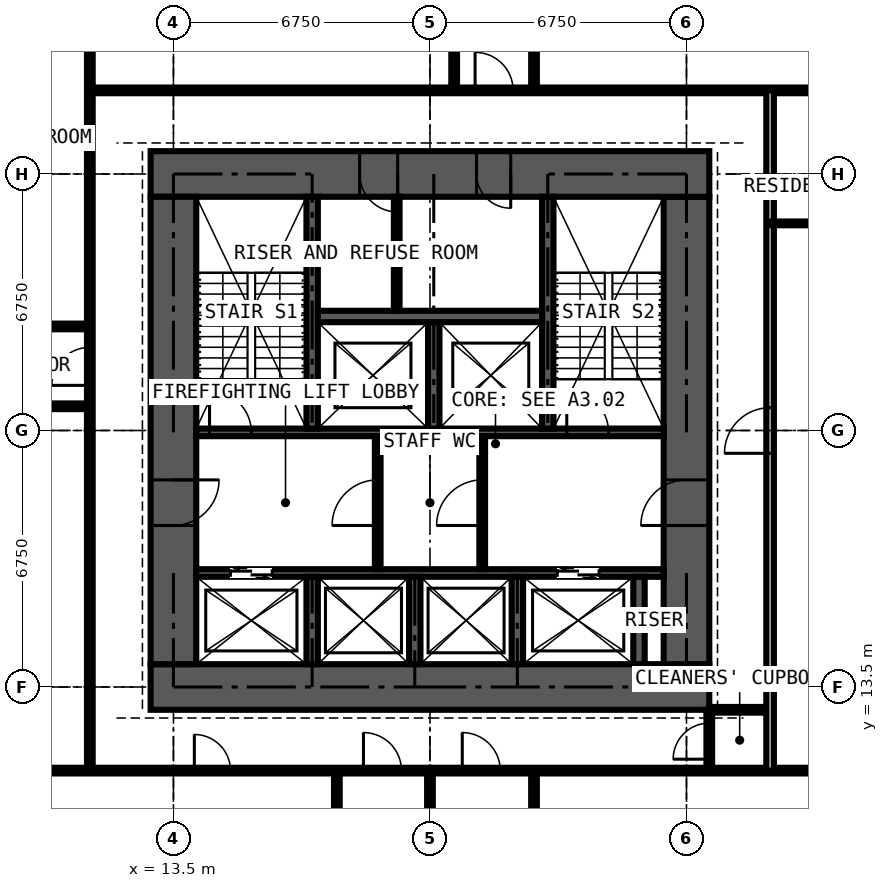
"""IFC4 building model, lengths in metres.
Left out: names, types, materials, properties, quantities, classifications, styles, units other than length and angle.
Written with IfcOpenShell. Run it as: python <this file> out.ifc"""

import sys

from ifc_helpers import new_model, si_unit, direction, frame, frame_2d, origin, place, context, subcontext, project, spatial, rectangle, extrude, element, fill, save


model = new_model("IFC4")
c1 = context("Model", 3, precision=1e-05, world=origin(), true_north=direction((0.0, 1.0)))
c2 = subcontext(c1, "Body", "Model", "MODEL_VIEW")
j1 = project(units=[si_unit("LENGTHUNIT", "METRE"), si_unit("PLANEANGLEUNIT", "RADIAN")], contexts=[c1])
p1 = place(None, origin())
s1 = spatial("IfcSite", under=j1, at=p1, CompositionType="ELEMENT")
p2 = place(p1, origin())
s2 = spatial("IfcBuilding", under=s1, at=p2, CompositionType="ELEMENT")
p3 = place(p2, frame((0.0, 0.0, 18.0)))
s3 = spatial("IfcBuildingStorey", under=s2, at=p3, CompositionType="ELEMENT", Elevation=18.0)
p4 = place(p3, frame((12.9, 13.5, 0.0), z_axis=(0.0, 0.0, 1.0), x_axis=(1.0, 0.0, 0.0)))
e1 = element("IfcWall", 1, at=p4, inside=s3, PredefinedType="SHEAR", context=c2, shape_type="SweptSolid", body=[
    extrude(rectangle(XDim=14.7, YDim=1.2, at=frame_2d((7.35, 0.0))), origin(), (0.0, 0.0, 1.0), 3.6),
])
p5 = place(p3, frame((27.0, 14.1, 0.0), z_axis=(0.0, 0.0, 1.0), x_axis=(0.0, 1.0, 0.0)))
e2 = element("IfcWall", 2, at=p5, inside=s3, PredefinedType="SHEAR", context=c2, shape_type="SweptSolid", body=[
    extrude(rectangle(XDim=12.3, YDim=1.2, at=frame_2d((6.15, 0.0))), origin(), (0.0, 0.0, 1.0), 3.6),
])
p6 = place(p5, frame((3.65, 0.0, 0.0)))
e3 = element("IfcOpeningElement", 3, at=p6, cuts=e2, PredefinedType="OPENING", context=c2, shape_type="SweptSolid", body=[
    extrude(rectangle(XDim=1.2, YDim=2.2, at=frame_2d((0.6, 1.1))), frame((0.0, 0.61, 0.0), z_axis=(0.0, -1.0, 0.0), x_axis=(1.0, 0.0, 0.0)), (0.0, 0.0, 1.0), 1.22),
])
p7 = place(p3, frame((27.6, 27.0, 0.0), z_axis=(0.0, 0.0, 1.0), x_axis=(-1.0, 0.0, 0.0)))
e4 = element("IfcWall", 4, at=p7, inside=s3, PredefinedType="SHEAR", context=c2, shape_type="SweptSolid", body=[
    extrude(rectangle(XDim=14.7, YDim=1.2, at=frame_2d((7.35, 0.0))), origin(), (0.0, 0.0, 1.0), 3.6),
])
p8 = place(p7, frame((5.225, 0.0, 0.0)))
e5 = element("IfcOpeningElement", 5, at=p8, cuts=e4, PredefinedType="OPENING", context=c2, shape_type="SweptSolid", body=[
    extrude(rectangle(XDim=0.9, YDim=2.2, at=frame_2d((0.45, 1.1))), frame((0.0, 0.61, 0.0), z_axis=(0.0, -1.0, 0.0), x_axis=(1.0, 0.0, 0.0)), (0.0, 0.0, 1.0), 1.22),
])
p9 = place(p7, frame((8.2, 0.0, 0.0)))
e6 = element("IfcOpeningElement", 6, at=p9, cuts=e4, PredefinedType="OPENING", context=c2, shape_type="SweptSolid", body=[
    extrude(rectangle(XDim=1.0, YDim=2.2, at=frame_2d((0.5, 1.1))), frame((0.0, 0.61, 0.0), z_axis=(0.0, -1.0, 0.0), x_axis=(1.0, 0.0, 0.0)), (0.0, 0.0, 1.0), 1.22),
])
p10 = place(p3, frame((13.5, 26.4, 0.0), z_axis=(0.0, 0.0, 1.0), x_axis=(0.0, -1.0, 0.0)))
e7 = element("IfcWall", 7, at=p10, inside=s3, PredefinedType="SHEAR", context=c2, shape_type="SweptSolid", body=[
    extrude(rectangle(XDim=12.3, YDim=1.2, at=frame_2d((6.15, 0.0))), origin(), (0.0, 0.0, 1.0), 3.6),
])
p11 = place(p10, frame((7.45, 0.0, 0.0)))
e8 = element("IfcOpeningElement", 8, at=p11, cuts=e7, PredefinedType="OPENING", context=c2, shape_type="SweptSolid", body=[
    extrude(rectangle(XDim=1.2, YDim=2.2, at=frame_2d((0.6, 1.1))), frame((0.0, 0.61, 0.0), z_axis=(0.0, -1.0, 0.0), x_axis=(1.0, 0.0, 0.0)), (0.0, 0.0, 1.0), 1.22),
])
p12 = place(p3, frame((14.1, 16.5, 0.0), z_axis=(0.0, 0.0, 1.0), x_axis=(1.0, 0.0, 0.0)))
e9 = element("IfcWall", 9, at=p12, inside=s3, PredefinedType="SHEAR", context=c2, shape_type="SweptSolid", body=[
    extrude(rectangle(XDim=12.3, YDim=0.2, at=frame_2d((6.15, 0.0))), origin(), (0.0, 0.0, 1.0), 3.6),
])
p13 = place(p12, frame((0.9, 0.0, 0.0)))
e10 = element("IfcOpeningElement", 10, at=p13, cuts=e9, PredefinedType="OPENING", context=c2, shape_type="SweptSolid", body=[
    extrude(rectangle(XDim=1.1, YDim=2.2, at=frame_2d((0.55, 1.1))), frame((0.0, 0.11, 0.0), z_axis=(0.0, -1.0, 0.0), x_axis=(1.0, 0.0, 0.0)), (0.0, 0.0, 1.0), 0.22),
])
p14 = place(p12, frame((9.5, 0.0, 0.0)))
e11 = element("IfcOpeningElement", 11, at=p14, cuts=e9, PredefinedType="OPENING", context=c2, shape_type="SweptSolid", body=[
    extrude(rectangle(XDim=1.1, YDim=2.2, at=frame_2d((0.55, 1.1))), frame((0.0, 0.11, 0.0), z_axis=(0.0, -1.0, 0.0), x_axis=(1.0, 0.0, 0.0)), (0.0, 0.0, 1.0), 0.22),
])
p15 = place(p3, frame((14.1, 20.2, 0.0), z_axis=(0.0, 0.0, 1.0), x_axis=(1.0, 0.0, 0.0)))
e12 = element("IfcWall", 12, at=p15, inside=s3, PredefinedType="SHEAR", context=c2, shape_type="SweptSolid", body=[
    extrude(rectangle(XDim=12.3, YDim=0.2, at=frame_2d((6.15, 0.0))), origin(), (0.0, 0.0, 1.0), 3.6),
])
p16 = place(p15, frame((0.35, 0.0, 0.0)))
e13 = element("IfcOpeningElement", 13, at=p16, cuts=e12, PredefinedType="OPENING", context=c2, shape_type="SweptSolid", body=[
    extrude(rectangle(XDim=1.1, YDim=2.2, at=frame_2d((0.55, 1.1))), frame((0.0, 0.11, 0.0), z_axis=(0.0, -1.0, 0.0), x_axis=(1.0, 0.0, 0.0)), (0.0, 0.0, 1.0), 0.22),
])
p17 = place(p15, frame((9.75, 0.0, 0.0)))
e14 = element("IfcOpeningElement", 14, at=p17, cuts=e12, PredefinedType="OPENING", context=c2, shape_type="SweptSolid", body=[
    extrude(rectangle(XDim=1.1, YDim=2.2, at=frame_2d((0.55, 1.1))), frame((0.0, 0.11, 0.0), z_axis=(0.0, -1.0, 0.0), x_axis=(1.0, 0.0, 0.0)), (0.0, 0.0, 1.0), 0.22),
])
for number, where, z_axis, x_axis in (
    (15, (17.15, 20.3, 0.0), (0.0, 0.0, 1.0), (0.0, 1.0, 0.0)),
    (16, (23.35, 20.3, 0.0), (0.0, 0.0, 1.0), (0.0, 1.0, 0.0)),
):
    element("IfcWall", number, at=place(p3, frame(where, z_axis=z_axis, x_axis=x_axis)), inside=s3, PredefinedType="SHEAR", context=c2, shape_type="SweptSolid", body=[
        extrude(rectangle(XDim=6.1, YDim=0.3, at=frame_2d((3.05, 0.0))), origin(), (0.0, 0.0, 1.0), 3.6),
    ])
p18 = place(p3, frame((20.35, 20.3, 0.0), z_axis=(0.0, 0.0, 1.0), x_axis=(0.0, 1.0, 0.0)))
e17 = element("IfcWall", 17, at=p18, inside=s3, PredefinedType="SHEAR", context=c2, shape_type="SweptSolid", body=[
    extrude(rectangle(XDim=2.8, YDim=0.3, at=frame_2d((1.4, 0.0))), origin(), (0.0, 0.0, 1.0), 3.6),
])
p19 = place(p3, frame((17.3, 23.25, 0.0), z_axis=(0.0, 0.0, 1.0), x_axis=(1.0, 0.0, 0.0)))
e18 = element("IfcWall", 18, at=p19, inside=s3, PredefinedType="SHEAR", context=c2, shape_type="SweptSolid", body=[
    extrude(rectangle(XDim=5.9, YDim=0.3, at=frame_2d((2.95, 0.0))), origin(), (0.0, 0.0, 1.0), 3.6),
])
for number, where, z_axis, x_axis in (
    (19, (17.15, 14.1, 0.0), (0.0, 0.0, 1.0), (0.0, 1.0, 0.0)),
    (20, (19.85, 14.1, 0.0), (0.0, 0.0, 1.0), (0.0, 1.0, 0.0)),
    (21, (22.55, 14.1, 0.0), (0.0, 0.0, 1.0), (0.0, 1.0, 0.0)),
    (22, (25.75, 14.1, 0.0), (0.0, 0.0, 1.0), (0.0, 1.0, 0.0)),
):
    element("IfcWall", number, at=place(p3, frame(where, z_axis=z_axis, x_axis=x_axis)), inside=s3, PredefinedType="SHEAR", context=c2, shape_type="SweptSolid", body=[
        extrude(rectangle(XDim=2.3, YDim=0.3, at=frame_2d((1.15, 0.0))), origin(), (0.0, 0.0, 1.0), 3.6),
    ])
p20 = place(p3, frame((18.875, 16.6, 0.0), z_axis=(0.0, 0.0, 1.0), x_axis=(0.0, 1.0, 0.0)))
e23 = element("IfcWall", 23, at=p20, inside=s3, PredefinedType="PARTITIONING", context=c2, shape_type="SweptSolid", body=[
    extrude(rectangle(XDim=3.5, YDim=0.15, at=frame_2d((1.75, 0.0))), origin(), (0.0, 0.0, 1.0), 3.375),
])
p21 = place(p20, frame((1.15, 0.0, 0.0)))
e24 = element("IfcOpeningElement", 24, at=p21, cuts=e23, PredefinedType="OPENING", context=c2, shape_type="SweptSolid", body=[
    extrude(rectangle(XDim=1.2, YDim=2.2, at=frame_2d((0.6, 1.1))), frame((0.0, 0.085, 0.0), z_axis=(0.0, -1.0, 0.0), x_axis=(1.0, 0.0, 0.0)), (0.0, 0.0, 1.0), 0.17),
])
p22 = place(p3, frame((21.625, 16.6, 0.0), z_axis=(0.0, 0.0, 1.0), x_axis=(0.0, 1.0, 0.0)))
e25 = element("IfcWall", 25, at=p22, inside=s3, PredefinedType="PARTITIONING", context=c2, shape_type="SweptSolid", body=[
    extrude(rectangle(XDim=3.5, YDim=0.15, at=frame_2d((1.75, 0.0))), origin(), (0.0, 0.0, 1.0), 3.375),
])
p23 = place(p22, frame((1.15, 0.0, 0.0)))
e26 = element("IfcOpeningElement", 26, at=p23, cuts=e25, PredefinedType="OPENING", context=c2, shape_type="SweptSolid", body=[
    extrude(rectangle(XDim=1.2, YDim=2.2, at=frame_2d((0.6, 1.1))), frame((0.0, 0.085, 0.0), z_axis=(0.0, -1.0, 0.0), x_axis=(1.0, 0.0, 0.0)), (0.0, 0.0, 1.0), 0.17),
])
p24 = place(p3, frame((19.375, 23.4, 0.0), z_axis=(0.0, 0.0, 1.0), x_axis=(0.0, 1.0, 0.0)))
e27 = element("IfcWall", 27, at=p24, inside=s3, PredefinedType="PARTITIONING", context=c2, shape_type="SweptSolid", body=[
    extrude(rectangle(XDim=3.0, YDim=0.15, at=frame_2d((1.5, 0.0))), origin(), (0.0, 0.0, 1.0), 3.375),
])
for number, where, z_axis, x_axis in (
    (28, (5.65, 20.887, 0.0), (0.0, 0.0, 1.0), (1.0, 0.0, 0.0)),
    (29, (5.65, 22.988, 0.0), (0.0, 0.0, 1.0), (1.0, 0.0, 0.0)),
):
    element("IfcWall", number, at=place(p3, frame(where, z_axis=z_axis, x_axis=x_axis)), inside=s3, PredefinedType="PARTITIONING", context=c2, shape_type="SweptSolid", body=[
        extrude(rectangle(XDim=5.65, YDim=0.15, at=frame_2d((2.825, 0.0))), origin(), (0.0, 0.0, 1.0), 3.375),
    ])
p25 = place(p3, frame((10.125, 11.3, 0.0), z_axis=(0.0, 0.0, 1.0), x_axis=(1.0, 0.0, 0.0)))
e30 = element("IfcWall", 30, at=p25, inside=s3, PredefinedType="PARTITIONING", context=c2, shape_type="SweptSolid", body=[
    extrude(rectangle(XDim=20.675, YDim=0.15, at=frame_2d((10.337, 0.0))), origin(), (0.0, 0.0, 1.0), 3.375),
])
p26 = place(p25, frame((8.375, 0.0, 0.0)))
e31 = element("IfcOpeningElement", 31, at=p26, cuts=e30, PredefinedType="OPENING", context=c2, shape_type="SweptSolid", body=[
    extrude(rectangle(XDim=1.0, YDim=2.2, at=frame_2d((0.5, 1.1))), frame((0.0, 0.085, 0.0), z_axis=(0.0, -1.0, 0.0), x_axis=(1.0, 0.0, 0.0)), (0.0, 0.0, 1.0), 0.17),
])
p27 = place(p25, frame((10.975, 0.0, 0.0)))
e32 = element("IfcOpeningElement", 32, at=p27, cuts=e30, PredefinedType="OPENING", context=c2, shape_type="SweptSolid", body=[
    extrude(rectangle(XDim=1.0, YDim=2.2, at=frame_2d((0.5, 1.1))), frame((0.0, 0.085, 0.0), z_axis=(0.0, -1.0, 0.0), x_axis=(1.0, 0.0, 0.0)), (0.0, 0.0, 1.0), 0.17),
])
p28 = place(p25, frame((3.925, 0.0, 0.0)))
e33 = element("IfcOpeningElement", 33, at=p28, cuts=e30, PredefinedType="OPENING", context=c2, shape_type="SweptSolid", body=[
    extrude(rectangle(XDim=0.95, YDim=2.2, at=frame_2d((0.475, 1.1))), frame((0.0, 0.085, 0.0), z_axis=(0.0, -1.0, 0.0), x_axis=(1.0, 0.0, 0.0)), (0.0, 0.0, 1.0), 0.17),
])
p29 = place(p3, frame((11.3, 11.3, 0.0), z_axis=(0.0, 0.0, 1.0), x_axis=(0.0, 1.0, 0.0)))
e34 = element("IfcWall", 34, at=p29, inside=s3, PredefinedType="PARTITIONING", context=c2, shape_type="SweptSolid", body=[
    extrude(rectangle(XDim=19.075, YDim=0.15, at=frame_2d((9.538, 0.0))), origin(), (0.0, 0.0, 1.0), 3.375),
])
p30 = place(p29, frame((10.137, 0.0, 0.0)))
e35 = element("IfcOpeningElement", 35, at=p30, cuts=e34, PredefinedType="OPENING", context=c2, shape_type="SweptSolid", body=[
    extrude(rectangle(XDim=1.0, YDim=2.2, at=frame_2d((0.5, 1.1))), frame((0.0, 0.085, 0.0), z_axis=(0.0, -1.0, 0.0), x_axis=(1.0, 0.0, 0.0)), (0.0, 0.0, 1.0), 0.17),
])
p31 = place(p3, frame((11.3, 29.2, 0.0), z_axis=(0.0, 0.0, 1.0), x_axis=(1.0, 0.0, 0.0)))
e36 = element("IfcWall", 36, at=p31, inside=s3, PredefinedType="PARTITIONING", context=c2, shape_type="SweptSolid", body=[
    extrude(rectangle(XDim=19.075, YDim=0.15, at=frame_2d((9.538, 0.0))), origin(), (0.0, 0.0, 1.0), 3.375),
])
p32 = place(p31, frame((10.137, 0.0, 0.0)))
e37 = element("IfcOpeningElement", 37, at=p32, cuts=e36, PredefinedType="OPENING", context=c2, shape_type="SweptSolid", body=[
    extrude(rectangle(XDim=1.0, YDim=2.2, at=frame_2d((0.5, 1.1))), frame((0.0, 0.085, 0.0), z_axis=(0.0, -1.0, 0.0), x_axis=(1.0, 0.0, 0.0)), (0.0, 0.0, 1.0), 0.17),
])
p33 = place(p3, frame((17.8, 5.65, 0.0), z_axis=(0.0, 0.0, 1.0), x_axis=(0.0, 1.0, 0.0)))
e38 = element("IfcWall", 38, at=p33, inside=s3, PredefinedType="PARTITIONING", context=c2, shape_type="SweptSolid", body=[
    extrude(rectangle(XDim=5.65, YDim=0.15, at=frame_2d((2.825, 0.0))), origin(), (0.0, 0.0, 1.0), 3.375),
])
p34 = place(p3, frame((20.25, -0.734, 0.0), z_axis=(0.0, 0.0, 1.0), x_axis=(0.0, 1.0, 0.0)))
e39 = element("IfcWall", 39, at=p34, inside=s3, PredefinedType="PARTITIONING", context=c2, shape_type="SweptSolid", body=[
    extrude(rectangle(XDim=12.034, YDim=0.15, at=frame_2d((6.017, 0.0))), origin(), (0.0, 0.0, 1.0), 2.61),
])
for number, where, z_axis, x_axis in (
    (40, (20.887, 29.2, 0.0), (0.0, 0.0, 1.0), (0.0, 1.0, 0.0)),
    (41, (22.988, 5.65, 0.0), (0.0, 0.0, 1.0), (0.0, 1.0, 0.0)),
    (42, (22.988, 29.2, 0.0), (0.0, 0.0, 1.0), (0.0, 1.0, 0.0)),
):
    element("IfcWall", number, at=place(p3, frame(where, z_axis=z_axis, x_axis=x_axis)), inside=s3, PredefinedType="PARTITIONING", context=c2, shape_type="SweptSolid", body=[
        extrude(rectangle(XDim=5.65, YDim=0.15, at=frame_2d((2.825, 0.0))), origin(), (0.0, 0.0, 1.0), 3.375),
    ])
p35 = place(p3, frame((27.6, 11.3, 0.0), z_axis=(0.0, 0.0, 1.0), x_axis=(0.0, 1.0, 0.0)))
e43 = element("IfcWall", 43, at=p35, inside=s3, PredefinedType="PARTITIONING", context=c2, shape_type="SweptSolid", body=[
    extrude(rectangle(XDim=1.6, YDim=0.15, at=frame_2d((0.8, 0.0))), origin(), (0.0, 0.0, 1.0), 3.375),
])
p36 = place(p35, frame((0.3, 0.0, 0.0)))
e44 = element("IfcOpeningElement", 44, at=p36, cuts=e43, PredefinedType="OPENING", context=c2, shape_type="SweptSolid", body=[
    extrude(rectangle(XDim=0.95, YDim=2.2, at=frame_2d((0.475, 1.1))), frame((0.0, 0.085, 0.0), z_axis=(0.0, -1.0, 0.0), x_axis=(1.0, 0.0, 0.0)), (0.0, 0.0, 1.0), 0.17),
])
p37 = place(p3, frame((27.6, 12.9, 0.0), z_axis=(0.0, 0.0, 1.0), x_axis=(1.0, 0.0, 0.0)))
e45 = element("IfcWall", 45, at=p37, inside=s3, PredefinedType="PARTITIONING", context=c2, shape_type="SweptSolid", body=[
    extrude(rectangle(XDim=1.6, YDim=0.15, at=frame_2d((0.8, 0.0))), origin(), (0.0, 0.0, 1.0), 2.877),
])
p38 = place(p3, frame((29.2, 11.3, 0.0), z_axis=(0.0, 0.0, 1.0), x_axis=(0.0, 1.0, 0.0)))
e46 = element("IfcWall", 46, at=p38, inside=s3, PredefinedType="PARTITIONING", context=c2, shape_type="SweptSolid", body=[
    extrude(rectangle(XDim=17.9, YDim=0.2, at=frame_2d((8.95, 0.0))), origin(), (0.0, 0.0, 1.0), 3.375),
])
p39 = place(p38, frame((8.35, 0.0, 0.0)))
e47 = element("IfcOpeningElement", 47, at=p39, cuts=e46, PredefinedType="OPENING", context=c2, shape_type="SweptSolid", body=[
    extrude(rectangle(XDim=1.2, YDim=2.2, at=frame_2d((0.6, 1.1))), frame((0.0, 0.11, 0.0), z_axis=(0.0, -1.0, 0.0), x_axis=(1.0, 0.0, 0.0)), (0.0, 0.0, 1.0), 0.22),
])
p40 = place(p3, frame((29.2, 25.7, 0.0), z_axis=(0.0, 0.0, 1.0), x_axis=(1.0, 0.0, 0.0)))
e48 = element("IfcWall", 48, at=p40, inside=s3, PredefinedType="SHEAR", context=c2, shape_type="SweptSolid", body=[
    extrude(rectangle(XDim=3.45, YDim=0.1, at=frame_2d((1.725, 0.0))), origin(), (0.0, 0.0, 1.0), 3.375),
])
p41 = place(p13, origin())
e49 = element("IfcDoor", 49, at=p41, inside=s3, OperationType="DOUBLE_DOOR_SLIDING", PredefinedType="DOOR", context=c2, shape_type="SweptSolid", body=[
    extrude(rectangle(XDim=1.1, YDim=2.2, at=frame_2d((0.55, 1.1))), frame((0.0, 0.025, 0.0), z_axis=(0.0, -1.0, 0.0), x_axis=(1.0, 0.0, 0.0)), (0.0, 0.0, 1.0), 0.05),
])
fill(e10, e49)
p42 = place(p14, origin())
e50 = element("IfcDoor", 50, at=p42, inside=s3, OperationType="DOUBLE_DOOR_SLIDING", PredefinedType="DOOR", context=c2, shape_type="SweptSolid", body=[
    extrude(rectangle(XDim=1.1, YDim=2.2, at=frame_2d((0.55, 1.1))), frame((0.0, 0.025, 0.0), z_axis=(0.0, -1.0, 0.0), x_axis=(1.0, 0.0, 0.0)), (0.0, 0.0, 1.0), 0.05),
])
fill(e11, e50)
p43 = place(p11, origin())
e51 = element("IfcDoor", 51, at=p43, inside=s3, OperationType="DOUBLE_DOOR_SINGLE_SWING", PredefinedType="DOOR", context=c2, shape_type="SweptSolid", body=[
    extrude(rectangle(XDim=1.2, YDim=2.2, at=frame_2d((0.6, 1.1))), frame((0.0, 0.025, 0.0), z_axis=(0.0, -1.0, 0.0), x_axis=(1.0, 0.0, 0.0)), (0.0, 0.0, 1.0), 0.05),
])
fill(e8, e51)
p44 = place(p6, origin())
e52 = element("IfcDoor", 52, at=p44, inside=s3, OperationType="DOUBLE_DOOR_SINGLE_SWING", PredefinedType="DOOR", context=c2, shape_type="SweptSolid", body=[
    extrude(rectangle(XDim=1.2, YDim=2.2, at=frame_2d((0.6, 1.1))), frame((0.0, 0.025, 0.0), z_axis=(0.0, -1.0, 0.0), x_axis=(1.0, 0.0, 0.0)), (0.0, 0.0, 1.0), 0.05),
])
fill(e3, e52)
p45 = place(p21, origin())
e53 = element("IfcDoor", 53, at=p45, inside=s3, OperationType="DOUBLE_DOOR_SINGLE_SWING", PredefinedType="DOOR", context=c2, shape_type="SweptSolid", body=[
    extrude(rectangle(XDim=1.2, YDim=2.2, at=frame_2d((0.6, 1.1))), frame((0.0, 0.025, 0.0), z_axis=(0.0, -1.0, 0.0), x_axis=(1.0, 0.0, 0.0)), (0.0, 0.0, 1.0), 0.05),
])
fill(e24, e53)
p46 = place(p23, origin())
e54 = element("IfcDoor", 54, at=p46, inside=s3, OperationType="DOUBLE_DOOR_SINGLE_SWING", PredefinedType="DOOR", context=c2, shape_type="SweptSolid", body=[
    extrude(rectangle(XDim=1.2, YDim=2.2, at=frame_2d((0.6, 1.1))), frame((0.0, 0.025, 0.0), z_axis=(0.0, -1.0, 0.0), x_axis=(1.0, 0.0, 0.0)), (0.0, 0.0, 1.0), 0.05),
])
fill(e26, e54)
p47 = place(p8, origin())
e55 = element("IfcDoor", 55, at=p47, inside=s3, OperationType="SINGLE_SWING_LEFT", PredefinedType="DOOR", context=c2, shape_type="SweptSolid", body=[
    extrude(rectangle(XDim=0.9, YDim=2.2, at=frame_2d((0.45, 1.1))), frame((0.0, 0.4, 0.0), z_axis=(0.0, -1.0, 0.0), x_axis=(1.0, 0.0, 0.0)), (0.0, 0.0, 1.0), 0.8),
])
fill(e5, e55)
p48 = place(p9, origin())
e56 = element("IfcDoor", 56, at=p48, inside=s3, OperationType="SINGLE_SWING_LEFT", PredefinedType="DOOR", context=c2, shape_type="SweptSolid", body=[
    extrude(rectangle(XDim=1.0, YDim=2.2, at=frame_2d((0.5, 1.1))), frame((0.0, 0.025, 0.0), z_axis=(0.0, -1.0, 0.0), x_axis=(1.0, 0.0, 0.0)), (0.0, 0.0, 1.0), 0.05),
])
fill(e6, e56)
p49 = place(p16, origin())
e57 = element("IfcDoor", 57, at=p49, inside=s3, OperationType="SINGLE_SWING_LEFT", PredefinedType="DOOR", context=c2, shape_type="SweptSolid", body=[
    extrude(rectangle(XDim=1.1, YDim=2.2, at=frame_2d((0.55, 1.1))), frame((0.0, 0.025, 0.0), z_axis=(0.0, -1.0, 0.0), x_axis=(1.0, 0.0, 0.0)), (0.0, 0.0, 1.0), 0.05),
])
fill(e13, e57)
p50 = place(p17, origin())
e58 = element("IfcDoor", 58, at=p50, inside=s3, OperationType="SINGLE_SWING_LEFT", PredefinedType="DOOR", context=c2, shape_type="SweptSolid", body=[
    extrude(rectangle(XDim=1.1, YDim=2.2, at=frame_2d((0.55, 1.1))), frame((0.0, 0.025, 0.0), z_axis=(0.0, -1.0, 0.0), x_axis=(1.0, 0.0, 0.0)), (0.0, 0.0, 1.0), 0.05),
])
fill(e14, e58)
p51 = place(p36, origin())
e59 = element("IfcDoor", 59, at=p51, inside=s3, OperationType="SINGLE_SWING_LEFT", PredefinedType="DOOR", context=c2, shape_type="SweptSolid", body=[
    extrude(rectangle(XDim=0.95, YDim=2.2, at=frame_2d((0.475, 1.1))), frame((0.0, 0.025, 0.0), z_axis=(0.0, -1.0, 0.0), x_axis=(1.0, 0.0, 0.0)), (0.0, 0.0, 1.0), 0.05),
])
fill(e44, e59)
p52 = place(p26, origin())
e60 = element("IfcDoor", 60, at=p52, inside=s3, OperationType="SINGLE_SWING_LEFT", PredefinedType="DOOR", context=c2, shape_type="SweptSolid", body=[
    extrude(rectangle(XDim=1.0, YDim=2.2, at=frame_2d((0.5, 1.1))), frame((0.0, 0.025, 0.0), z_axis=(0.0, -1.0, 0.0), x_axis=(1.0, 0.0, 0.0)), (0.0, 0.0, 1.0), 0.05),
])
fill(e31, e60)
p53 = place(p27, origin())
e61 = element("IfcDoor", 61, at=p53, inside=s3, OperationType="SINGLE_SWING_LEFT", PredefinedType="DOOR", context=c2, shape_type="SweptSolid", body=[
    extrude(rectangle(XDim=1.0, YDim=2.2, at=frame_2d((0.5, 1.1))), frame((0.0, 0.025, 0.0), z_axis=(0.0, -1.0, 0.0), x_axis=(1.0, 0.0, 0.0)), (0.0, 0.0, 1.0), 0.05),
])
fill(e32, e61)
p54 = place(p28, origin())
e62 = element("IfcDoor", 62, at=p54, inside=s3, OperationType="SINGLE_SWING_LEFT", PredefinedType="DOOR", context=c2, shape_type="SweptSolid", body=[
    extrude(rectangle(XDim=0.95, YDim=2.2, at=frame_2d((0.475, 1.1))), frame((0.0, 0.025, 0.0), z_axis=(0.0, -1.0, 0.0), x_axis=(1.0, 0.0, 0.0)), (0.0, 0.0, 1.0), 0.05),
])
fill(e33, e62)
p55 = place(p32, origin())
e63 = element("IfcDoor", 63, at=p55, inside=s3, OperationType="SINGLE_SWING_LEFT", PredefinedType="DOOR", context=c2, shape_type="SweptSolid", body=[
    extrude(rectangle(XDim=1.0, YDim=2.2, at=frame_2d((0.5, 1.1))), frame((0.0, 0.025, 0.0), z_axis=(0.0, -1.0, 0.0), x_axis=(1.0, 0.0, 0.0)), (0.0, 0.0, 1.0), 0.05),
])
fill(e37, e63)
p56 = place(p30, origin())
e64 = element("IfcDoor", 64, at=p56, inside=s3, OperationType="SINGLE_SWING_LEFT", PredefinedType="DOOR", context=c2, shape_type="SweptSolid", body=[
    extrude(rectangle(XDim=1.0, YDim=2.2, at=frame_2d((0.5, 1.1))), frame((0.0, 0.025, 0.0), z_axis=(0.0, -1.0, 0.0), x_axis=(1.0, 0.0, 0.0)), (0.0, 0.0, 1.0), 0.05),
])
fill(e35, e64)
p57 = place(p39, origin())
e65 = element("IfcDoor", 65, at=p57, inside=s3, OperationType="DOUBLE_DOOR_SINGLE_SWING", PredefinedType="DOOR", context=c2, shape_type="SweptSolid", body=[
    extrude(rectangle(XDim=1.2, YDim=2.2, at=frame_2d((0.6, 1.1))), frame((0.0, 0.025, 0.0), z_axis=(0.0, -1.0, 0.0), x_axis=(1.0, 0.0, 0.0)), (0.0, 0.0, 1.0), 0.05),
])
fill(e47, e65)
save(model, sys.argv[1])
